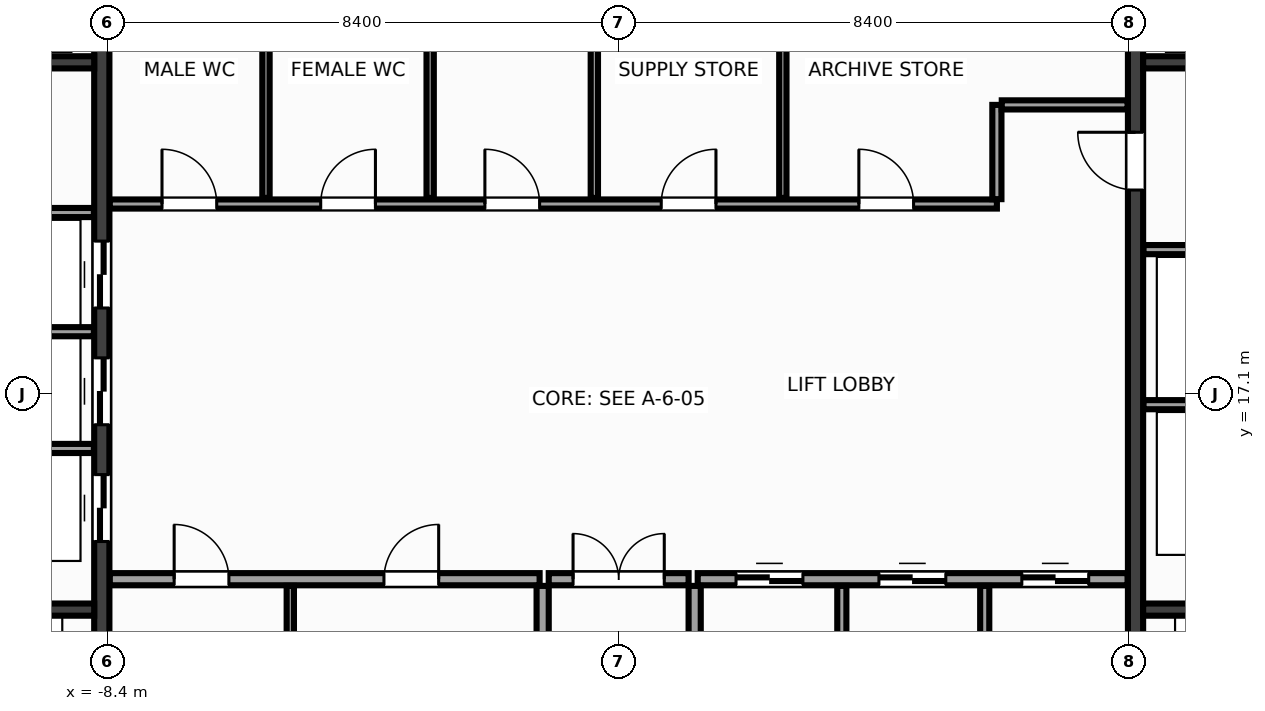
"""IFC4 building model, lengths in metres.
Left out: names, types, materials, properties, quantities, classifications, styles, units other than length and angle.
Written with IfcOpenShell. Run it as: python <this file> out.ifc"""

import sys

from ifc_helpers import new_model, si_unit, direction, frame, frame_2d, origin, place, context, subcontext, project, spatial, rectangle, extrude, source, transform, mapped, element, fill, save


model = new_model("IFC4")
c1 = context("Model", 3, precision=1e-05, world=origin(), true_north=direction((0.0, 1.0)))
c2 = subcontext(c1, "Body", "Model", "MODEL_VIEW")
j1 = project(units=[si_unit("LENGTHUNIT", "METRE"), si_unit("PLANEANGLEUNIT", "RADIAN")], contexts=[c1])
p1 = place(None, origin())
s1 = spatial("IfcSite", under=j1, at=p1, CompositionType="ELEMENT")
p2 = place(p1, origin())
s2 = spatial("IfcBuilding", under=s1, at=p2, CompositionType="ELEMENT")
p3 = place(p2, frame((0.0, 0.0, 138.8)))
s3 = spatial("IfcBuildingStorey", under=s2, at=p3, CompositionType="ELEMENT", Elevation=138.8)
m1 = source(origin(), c2, "Body", "SweptSolid", [
    extrude(rectangle(XDim=12.95, YDim=0.25, at=frame_2d((6.475, 0.0))), origin(), (0.0, 0.0, 1.0), 3.6),
])
p4 = place(p3, frame((-8.5, 10.525, 0.0), z_axis=(0.0, 0.0, 1.0), x_axis=(0.0, 1.0, 0.0)))
e1 = element("IfcWall", 1, at=p4, inside=s3, PredefinedType="SHEAR", context=c2, shape_type="MappedRepresentation", body=[
    mapped(m1, transform((0.0, 0.0, 0.0), x_axis=(1.0, 0.0, 0.0), y_axis=(0.0, 1.0, 0.0), z_axis=(0.0, 0.0, 1.0), scale=1.0)),
])
p5 = place(p4, frame((4.145, 0.0, 0.0)))
e2 = element("IfcOpeningElement", 2, at=p5, cuts=e1, PredefinedType="OPENING", context=c2, shape_type="SweptSolid", body=[
    extrude(rectangle(XDim=1.1, YDim=2.15, at=frame_2d((0.55, 1.075))), frame((0.0, 0.137, 0.0), z_axis=(0.0, -1.0, 0.0), x_axis=(1.0, 0.0, 0.0)), (0.0, 0.0, 1.0), 0.274),
])
p6 = place(p4, frame((6.065, 0.0, 0.0)))
e3 = element("IfcOpeningElement", 3, at=p6, cuts=e1, PredefinedType="OPENING", context=c2, shape_type="SweptSolid", body=[
    extrude(rectangle(XDim=1.1, YDim=2.15, at=frame_2d((0.55, 1.075))), frame((0.0, 0.137, 0.0), z_axis=(0.0, -1.0, 0.0), x_axis=(1.0, 0.0, 0.0)), (0.0, 0.0, 1.0), 0.274),
])
p7 = place(p4, frame((7.985, 0.0, 0.0)))
e4 = element("IfcOpeningElement", 4, at=p7, cuts=e1, PredefinedType="OPENING", context=c2, shape_type="SweptSolid", body=[
    extrude(rectangle(XDim=1.1, YDim=2.15, at=frame_2d((0.55, 1.075))), frame((0.0, 0.137, 0.0), z_axis=(0.0, -1.0, 0.0), x_axis=(1.0, 0.0, 0.0)), (0.0, 0.0, 1.0), 0.274),
])
p8 = place(p3, frame((8.5, 10.525, 0.0), z_axis=(0.0, 0.0, 1.0), x_axis=(0.0, 1.0, 0.0)))
e5 = element("IfcWall", 5, at=p8, inside=s3, PredefinedType="SHEAR", context=c2, shape_type="MappedRepresentation", body=[
    mapped(m1, transform((0.0, 0.0, 0.0), x_axis=(1.0, 0.0, 0.0), y_axis=(0.0, 1.0, 0.0), z_axis=(0.0, 0.0, 1.0), scale=1.0)),
])
p9 = place(p8, frame((9.925, 0.0, 0.0)))
e6 = element("IfcOpeningElement", 6, at=p9, cuts=e5, PredefinedType="OPENING", context=c2, shape_type="SweptSolid", body=[
    extrude(rectangle(XDim=0.95, YDim=2.15, at=frame_2d((0.475, 1.075))), frame((0.0, 0.137, 0.0), z_axis=(0.0, -1.0, 0.0), x_axis=(1.0, 0.0, 0.0)), (0.0, 0.0, 1.0), 0.274),
])
m2 = source(origin(), c2, "Body", "SweptSolid", [
    extrude(rectangle(XDim=2.825, YDim=0.2, at=frame_2d((1.413, 0.0))), origin(), (0.0, 0.0, 1.0), 3.6),
])
for number, where, z_axis, x_axis in (
    (7, (-11.45, 13.55, 0.0), (0.0, 0.0, 1.0), (1.0, 0.0, 0.0)),
    (8, (8.625, 13.55, 0.0), (0.0, 0.0, 1.0), (1.0, 0.0, 0.0)),
):
    element("IfcWall", number, at=place(p3, frame(where, z_axis=z_axis, x_axis=x_axis)), inside=s3, PredefinedType="SHEAR", context=c2, shape_type="MappedRepresentation", body=[
        mapped(m2, transform((0.0, 0.0, 0.0), x_axis=(1.0, 0.0, 0.0), y_axis=(0.0, 1.0, 0.0), z_axis=(0.0, 0.0, 1.0), scale=1.0)),
    ])
m3 = source(origin(), c2, "Body", "SweptSolid", [
    extrude(rectangle(XDim=3.02, YDim=0.2, at=frame_2d((1.51, 0.0))), origin(), (0.0, 0.0, 1.0), 3.6),
])
for number, where, z_axis, x_axis in (
    (9, (-11.645, 22.55, 0.0), (0.0, 0.0, 1.0), (1.0, 0.0, 0.0)),
    (10, (8.625, 22.55, 0.0), (0.0, 0.0, 1.0), (1.0, 0.0, 0.0)),
):
    element("IfcWall", number, at=place(p3, frame(where, z_axis=z_axis, x_axis=x_axis)), inside=s3, PredefinedType="SHEAR", context=c2, shape_type="MappedRepresentation", body=[
        mapped(m3, transform((0.0, 0.0, 0.0), x_axis=(1.0, 0.0, 0.0), y_axis=(0.0, 1.0, 0.0), z_axis=(0.0, 0.0, 1.0), scale=1.0)),
    ])
m4 = source(origin(), c2, "Body", "SweptSolid", [
    extrude(rectangle(XDim=3.01, YDim=0.15, at=frame_2d((1.505, 0.0))), origin(), (0.0, 0.0, 1.0), 3.38),
])
for number, where, z_axis, x_axis in (
    (11, (-11.64, 16.2, 0.0), (0.0, 0.0, 1.0), (1.0, 0.0, 0.0)),
    (12, (-11.64, 18.12, 0.0), (0.0, 0.0, 1.0), (1.0, 0.0, 0.0)),
    (13, (-11.64, 20.08, 0.0), (0.0, 0.0, 1.0), (1.0, 0.0, 0.0)),
    (14, (8.63, 16.92, 0.0), (0.0, 0.0, 1.0), (1.0, 0.0, 0.0)),
    (15, (8.63, 19.47, 0.0), (0.0, 0.0, 1.0), (1.0, 0.0, 0.0)),
):
    element("IfcWall", number, at=place(p3, frame(where, z_axis=z_axis, x_axis=x_axis)), inside=s3, PredefinedType="PARTITIONING", context=c2, shape_type="MappedRepresentation", body=[
        mapped(m4, transform((0.0, 0.0, 0.0), x_axis=(1.0, 0.0, 0.0), y_axis=(0.0, 1.0, 0.0), z_axis=(0.0, 0.0, 1.0), scale=1.0)),
    ])
m5 = source(origin(), c2, "Body", "SweptSolid", [
    extrude(rectangle(XDim=7.07, YDim=0.2, at=frame_2d((3.535, 0.0))), origin(), (0.0, 0.0, 1.0), 3.38),
])
p10 = place(p3, frame((-8.37, 14.05, 0.0), z_axis=(0.0, 0.0, 1.0), x_axis=(1.0, 0.0, 0.0)))
e16 = element("IfcWall", 16, at=p10, inside=s3, PredefinedType="PARTITIONING", context=c2, shape_type="MappedRepresentation", body=[
    mapped(m5, transform((0.0, 0.0, 0.0), x_axis=(1.0, 0.0, 0.0), y_axis=(0.0, 1.0, 0.0), z_axis=(0.0, 0.0, 1.0), scale=1.0)),
])
p11 = place(p10, frame((1.06, 0.0, 0.0)))
e17 = element("IfcOpeningElement", 17, at=p11, cuts=e16, PredefinedType="OPENING", context=c2, shape_type="SweptSolid", body=[
    extrude(rectangle(XDim=0.9, YDim=2.15, at=frame_2d((0.45, 1.075))), frame((0.0, 0.112, 0.0), z_axis=(0.0, -1.0, 0.0), x_axis=(1.0, 0.0, 0.0)), (0.0, 0.0, 1.0), 0.224),
])
p12 = place(p10, frame((4.51, 0.0, 0.0)))
e18 = element("IfcOpeningElement", 18, at=p12, cuts=e16, PredefinedType="OPENING", context=c2, shape_type="SweptSolid", body=[
    extrude(rectangle(XDim=0.9, YDim=2.15, at=frame_2d((0.45, 1.075))), frame((0.0, 0.112, 0.0), z_axis=(0.0, -1.0, 0.0), x_axis=(1.0, 0.0, 0.0)), (0.0, 0.0, 1.0), 0.224),
])
p13 = place(p3, frame((1.3, 14.05, 0.0), z_axis=(0.0, 0.0, 1.0), x_axis=(1.0, 0.0, 0.0)))
e19 = element("IfcWall", 19, at=p13, inside=s3, PredefinedType="PARTITIONING", context=c2, shape_type="MappedRepresentation", body=[
    mapped(m5, transform((0.0, 0.0, 0.0), x_axis=(1.0, 0.0, 0.0), y_axis=(0.0, 1.0, 0.0), z_axis=(0.0, 0.0, 1.0), scale=1.0)),
])
p14 = place(p13, frame((0.63, 0.0, 0.0)))
e20 = element("IfcOpeningElement", 20, at=p14, cuts=e19, PredefinedType="OPENING", context=c2, shape_type="SweptSolid", body=[
    extrude(rectangle(XDim=1.1, YDim=2.15, at=frame_2d((0.55, 1.075))), frame((0.0, 0.112, 0.0), z_axis=(0.0, -1.0, 0.0), x_axis=(1.0, 0.0, 0.0)), (0.0, 0.0, 1.0), 0.224),
])
p15 = place(p13, frame((2.98, 0.0, 0.0)))
e21 = element("IfcOpeningElement", 21, at=p15, cuts=e19, PredefinedType="OPENING", context=c2, shape_type="SweptSolid", body=[
    extrude(rectangle(XDim=1.1, YDim=2.15, at=frame_2d((0.55, 1.075))), frame((0.0, 0.112, 0.0), z_axis=(0.0, -1.0, 0.0), x_axis=(1.0, 0.0, 0.0)), (0.0, 0.0, 1.0), 0.224),
])
p16 = place(p13, frame((5.33, 0.0, 0.0)))
e22 = element("IfcOpeningElement", 22, at=p16, cuts=e19, PredefinedType="OPENING", context=c2, shape_type="SweptSolid", body=[
    extrude(rectangle(XDim=1.1, YDim=2.15, at=frame_2d((0.55, 1.075))), frame((0.0, 0.112, 0.0), z_axis=(0.0, -1.0, 0.0), x_axis=(1.0, 0.0, 0.0)), (0.0, 0.0, 1.0), 0.224),
])
m6 = source(origin(), c2, "Body", "SweptSolid", [
    extrude(rectangle(XDim=3.415, YDim=0.2, at=frame_2d((1.708, 0.0))), origin(), (0.0, 0.0, 1.0), 3.38),
])
for number, where, z_axis, x_axis in (
    (23, (-1.25, 10.525, 0.0), (0.0, 0.0, 1.0), (0.0, 1.0, 0.0)),
    (24, (1.25, 10.525, 0.0), (0.0, 0.0, 1.0), (0.0, 1.0, 0.0)),
):
    element("IfcWall", number, at=place(p3, frame(where, z_axis=z_axis, x_axis=x_axis)), inside=s3, PredefinedType="PARTITIONING", context=c2, shape_type="MappedRepresentation", body=[
        mapped(m6, transform((0.0, 0.0, 0.0), x_axis=(1.0, 0.0, 0.0), y_axis=(0.0, 1.0, 0.0), z_axis=(0.0, 0.0, 1.0), scale=1.0)),
    ])
m7 = source(origin(), c2, "Body", "SweptSolid", [
    extrude(rectangle(XDim=2.3, YDim=0.2, at=frame_2d((1.15, 0.0))), origin(), (0.0, 0.0, 1.0), 3.38),
])
p17 = place(p3, frame((-1.15, 14.05, 0.0), z_axis=(0.0, 0.0, 1.0), x_axis=(1.0, 0.0, 0.0)))
e25 = element("IfcWall", 25, at=p17, inside=s3, PredefinedType="PARTITIONING", context=c2, shape_type="MappedRepresentation", body=[
    mapped(m7, transform((0.0, 0.0, 0.0), x_axis=(1.0, 0.0, 0.0), y_axis=(0.0, 1.0, 0.0), z_axis=(0.0, 0.0, 1.0), scale=1.0)),
])
p18 = place(p17, frame((0.4, 0.0, 0.0)))
e26 = element("IfcOpeningElement", 26, at=p18, cuts=e25, PredefinedType="OPENING", context=c2, shape_type="SweptSolid", body=[
    extrude(rectangle(XDim=1.5, YDim=2.2, at=frame_2d((0.75, 1.1))), frame((0.0, 0.112, 0.0), z_axis=(0.0, -1.0, 0.0), x_axis=(1.0, 0.0, 0.0)), (0.0, 0.0, 1.0), 0.224),
])
m8 = source(origin(), c2, "Body", "SweptSolid", [
    extrude(rectangle(XDim=14.59, YDim=0.15, at=frame_2d((7.295, 0.0))), origin(), (0.0, 0.0, 1.0), 3.38),
])
p19 = place(p3, frame((-8.37, 20.22, 0.0), z_axis=(0.0, 0.0, 1.0), x_axis=(1.0, 0.0, 0.0)))
e27 = element("IfcWall", 27, at=p19, inside=s3, PredefinedType="PARTITIONING", context=c2, shape_type="MappedRepresentation", body=[
    mapped(m8, transform((0.0, 0.0, 0.0), x_axis=(1.0, 0.0, 0.0), y_axis=(0.0, 1.0, 0.0), z_axis=(0.0, 0.0, 1.0), scale=1.0)),
])
p20 = place(p19, frame((0.86, 0.0, 0.0)))
e28 = element("IfcOpeningElement", 28, at=p20, cuts=e27, PredefinedType="OPENING", context=c2, shape_type="SweptSolid", body=[
    extrude(rectangle(XDim=0.9, YDim=2.15, at=frame_2d((0.45, 1.075))), frame((0.0, 0.087, 0.0), z_axis=(0.0, -1.0, 0.0), x_axis=(1.0, 0.0, 0.0)), (0.0, 0.0, 1.0), 0.174),
])
p21 = place(p19, frame((3.47, 0.0, 0.0)))
e29 = element("IfcOpeningElement", 29, at=p21, cuts=e27, PredefinedType="OPENING", context=c2, shape_type="SweptSolid", body=[
    extrude(rectangle(XDim=0.9, YDim=2.15, at=frame_2d((0.45, 1.075))), frame((0.0, 0.087, 0.0), z_axis=(0.0, -1.0, 0.0), x_axis=(1.0, 0.0, 0.0)), (0.0, 0.0, 1.0), 0.174),
])
p22 = place(p19, frame((6.17, 0.0, 0.0)))
e30 = element("IfcOpeningElement", 30, at=p22, cuts=e27, PredefinedType="OPENING", context=c2, shape_type="SweptSolid", body=[
    extrude(rectangle(XDim=0.9, YDim=2.15, at=frame_2d((0.45, 1.075))), frame((0.0, 0.087, 0.0), z_axis=(0.0, -1.0, 0.0), x_axis=(1.0, 0.0, 0.0)), (0.0, 0.0, 1.0), 0.174),
])
p23 = place(p19, frame((9.07, 0.0, 0.0)))
e31 = element("IfcOpeningElement", 31, at=p23, cuts=e27, PredefinedType="OPENING", context=c2, shape_type="SweptSolid", body=[
    extrude(rectangle(XDim=0.9, YDim=2.15, at=frame_2d((0.45, 1.075))), frame((0.0, 0.087, 0.0), z_axis=(0.0, -1.0, 0.0), x_axis=(1.0, 0.0, 0.0)), (0.0, 0.0, 1.0), 0.174),
])
p24 = place(p19, frame((12.32, 0.0, 0.0)))
e32 = element("IfcOpeningElement", 32, at=p24, cuts=e27, PredefinedType="OPENING", context=c2, shape_type="SweptSolid", body=[
    extrude(rectangle(XDim=0.9, YDim=2.15, at=frame_2d((0.45, 1.075))), frame((0.0, 0.087, 0.0), z_axis=(0.0, -1.0, 0.0), x_axis=(1.0, 0.0, 0.0)), (0.0, 0.0, 1.0), 0.174),
])
m9 = source(origin(), c2, "Body", "SweptSolid", [
    extrude(rectangle(XDim=1.55, YDim=0.15, at=frame_2d((0.775, 0.0))), origin(), (0.0, 0.0, 1.0), 3.38),
])
p25 = place(p3, frame((6.22, 20.3, 0.0), z_axis=(0.0, 0.0, 1.0), x_axis=(0.0, 1.0, 0.0)))
e33 = element("IfcWall", 33, at=p25, inside=s3, PredefinedType="PARTITIONING", context=c2, shape_type="MappedRepresentation", body=[
    mapped(m9, transform((0.0, 0.0, 0.0), x_axis=(1.0, 0.0, 0.0), y_axis=(0.0, 1.0, 0.0), z_axis=(0.0, 0.0, 1.0), scale=1.0)),
])
m10 = source(origin(), c2, "Body", "SweptSolid", [
    extrude(rectangle(XDim=2.07, YDim=0.15, at=frame_2d((1.035, 0.0))), origin(), (0.0, 0.0, 1.0), 3.38),
])
p26 = place(p3, frame((6.3, 21.85, 0.0), z_axis=(0.0, 0.0, 1.0), x_axis=(1.0, 0.0, 0.0)))
e34 = element("IfcWall", 34, at=p26, inside=s3, PredefinedType="PARTITIONING", context=c2, shape_type="MappedRepresentation", body=[
    mapped(m10, transform((0.0, 0.0, 0.0), x_axis=(1.0, 0.0, 0.0), y_axis=(0.0, 1.0, 0.0), z_axis=(0.0, 0.0, 1.0), scale=1.0)),
])
m11 = source(origin(), c2, "Body", "SweptSolid", [
    extrude(rectangle(XDim=3.415, YDim=0.12, at=frame_2d((1.708, 0.0))), origin(), (0.0, 0.0, 1.0), 3.38),
])
p27 = place(p3, frame((-5.4, 10.525, 0.0), z_axis=(0.0, 0.0, 1.0), x_axis=(0.0, 1.0, 0.0)))
e35 = element("IfcWall", 35, at=p27, inside=s3, PredefinedType="PARTITIONING", context=c2, shape_type="MappedRepresentation", body=[
    mapped(m11, transform((0.0, 0.0, 0.0), x_axis=(1.0, 0.0, 0.0), y_axis=(0.0, 1.0, 0.0), z_axis=(0.0, 0.0, 1.0), scale=1.0)),
])
m12 = source(origin(), c2, "Body", "SweptSolid", [
    extrude(rectangle(XDim=3.415, YDim=0.15, at=frame_2d((1.708, 0.0))), origin(), (0.0, 0.0, 1.0), 3.38),
])
for number, where, z_axis, x_axis in (
    (36, (3.67, 10.525, 0.0), (0.0, 0.0, 1.0), (0.0, 1.0, 0.0)),
    (37, (6.02, 10.525, 0.0), (0.0, 0.0, 1.0), (0.0, 1.0, 0.0)),
):
    element("IfcWall", number, at=place(p3, frame(where, z_axis=z_axis, x_axis=x_axis)), inside=s3, PredefinedType="PARTITIONING", context=c2, shape_type="MappedRepresentation", body=[
        mapped(m12, transform((0.0, 0.0, 0.0), x_axis=(1.0, 0.0, 0.0), y_axis=(0.0, 1.0, 0.0), z_axis=(0.0, 0.0, 1.0), scale=1.0)),
    ])
m13 = source(origin(), c2, "Body", "SweptSolid", [
    extrude(rectangle(XDim=3.115, YDim=0.12, at=frame_2d((1.558, 0.0))), origin(), (0.0, 0.0, 1.0), 3.38),
])
for number, where, z_axis, x_axis in (
    (38, (-5.8, 20.32, 0.0), (0.0, 0.0, 1.0), (0.0, 1.0, 0.0)),
    (39, (-3.1, 20.32, 0.0), (0.0, 0.0, 1.0), (0.0, 1.0, 0.0)),
    (40, (-0.4, 20.32, 0.0), (0.0, 0.0, 1.0), (0.0, 1.0, 0.0)),
    (41, (2.7, 20.32, 0.0), (0.0, 0.0, 1.0), (0.0, 1.0, 0.0)),
):
    element("IfcWall", number, at=place(p3, frame(where, z_axis=z_axis, x_axis=x_axis)), inside=s3, PredefinedType="PARTITIONING", context=c2, shape_type="MappedRepresentation", body=[
        mapped(m13, transform((0.0, 0.0, 0.0), x_axis=(1.0, 0.0, 0.0), y_axis=(0.0, 1.0, 0.0), z_axis=(0.0, 0.0, 1.0), scale=1.0)),
    ])
m14 = source(origin(), c2, "Body", "SweptSolid", [
    extrude(rectangle(XDim=1.1, YDim=2.15, at=frame_2d((0.55, 1.075))), frame((0.0, 0.025, 0.0), z_axis=(0.0, -1.0, 0.0), x_axis=(1.0, 0.0, 0.0)), (0.0, 0.0, 1.0), 0.05),
])
p28 = place(p5, origin())
e42 = element("IfcDoor", 42, at=p28, inside=s3, OperationType="DOUBLE_DOOR_SLIDING", PredefinedType="DOOR", context=c2, shape_type="MappedRepresentation", body=[
    mapped(m14, transform((0.0, 0.0, 0.0), x_axis=(1.0, 0.0, 0.0), y_axis=(0.0, 1.0, 0.0), z_axis=(0.0, 0.0, 1.0), scale=1.0)),
])
fill(e2, e42)
p29 = place(p6, origin())
e43 = element("IfcDoor", 43, at=p29, inside=s3, OperationType="DOUBLE_DOOR_SLIDING", PredefinedType="DOOR", context=c2, shape_type="MappedRepresentation", body=[
    mapped(m14, transform((0.0, 0.0, 0.0), x_axis=(1.0, 0.0, 0.0), y_axis=(0.0, 1.0, 0.0), z_axis=(0.0, 0.0, 1.0), scale=1.0)),
])
fill(e3, e43)
p30 = place(p7, origin())
e44 = element("IfcDoor", 44, at=p30, inside=s3, OperationType="DOUBLE_DOOR_SLIDING", PredefinedType="DOOR", context=c2, shape_type="MappedRepresentation", body=[
    mapped(m14, transform((0.0, 0.0, 0.0), x_axis=(1.0, 0.0, 0.0), y_axis=(0.0, 1.0, 0.0), z_axis=(0.0, 0.0, 1.0), scale=1.0)),
])
fill(e4, e44)
m15 = source(origin(), c2, "Body", "SweptSolid", [
    extrude(rectangle(XDim=0.95, YDim=2.15, at=frame_2d((0.475, 1.075))), frame((0.0, 0.025, 0.0), z_axis=(0.0, -1.0, 0.0), x_axis=(1.0, 0.0, 0.0)), (0.0, 0.0, 1.0), 0.05),
])
p31 = place(p9, origin())
e45 = element("IfcDoor", 45, at=p31, inside=s3, OperationType="SINGLE_SWING_RIGHT", PredefinedType="DOOR", context=c2, shape_type="MappedRepresentation", body=[
    mapped(m15, transform((0.0, 0.0, 0.0), x_axis=(1.0, 0.0, 0.0), y_axis=(0.0, 1.0, 0.0), z_axis=(0.0, 0.0, 1.0), scale=1.0)),
])
fill(e6, e45)
m16 = source(origin(), c2, "Body", "SweptSolid", [
    extrude(rectangle(XDim=0.9, YDim=2.15, at=frame_2d((0.45, 1.075))), frame((0.0, 0.025, 0.0), z_axis=(0.0, -1.0, 0.0), x_axis=(1.0, 0.0, 0.0)), (0.0, 0.0, 1.0), 0.05),
])
p32 = place(p11, origin())
e46 = element("IfcDoor", 46, at=p32, inside=s3, OperationType="SINGLE_SWING_LEFT", PredefinedType="DOOR", context=c2, shape_type="MappedRepresentation", body=[
    mapped(m16, transform((0.0, 0.0, 0.0), x_axis=(1.0, 0.0, 0.0), y_axis=(0.0, 1.0, 0.0), z_axis=(0.0, 0.0, 1.0), scale=1.0)),
])
fill(e17, e46)
p33 = place(p12, origin())
e47 = element("IfcDoor", 47, at=p33, inside=s3, OperationType="SINGLE_SWING_RIGHT", PredefinedType="DOOR", context=c2, shape_type="MappedRepresentation", body=[
    mapped(m16, transform((0.0, 0.0, 0.0), x_axis=(1.0, 0.0, 0.0), y_axis=(0.0, 1.0, 0.0), z_axis=(0.0, 0.0, 1.0), scale=1.0)),
])
fill(e18, e47)
p34 = place(p14, origin())
e48 = element("IfcDoor", 48, at=p34, inside=s3, OperationType="DOUBLE_DOOR_SLIDING", PredefinedType="DOOR", context=c2, shape_type="MappedRepresentation", body=[
    mapped(m14, transform((0.0, 0.0, 0.0), x_axis=(1.0, 0.0, 0.0), y_axis=(0.0, 1.0, 0.0), z_axis=(0.0, 0.0, 1.0), scale=1.0)),
])
fill(e20, e48)
p35 = place(p15, origin())
e49 = element("IfcDoor", 49, at=p35, inside=s3, OperationType="DOUBLE_DOOR_SLIDING", PredefinedType="DOOR", context=c2, shape_type="MappedRepresentation", body=[
    mapped(m14, transform((0.0, 0.0, 0.0), x_axis=(1.0, 0.0, 0.0), y_axis=(0.0, 1.0, 0.0), z_axis=(0.0, 0.0, 1.0), scale=1.0)),
])
fill(e21, e49)
p36 = place(p16, origin())
e50 = element("IfcDoor", 50, at=p36, inside=s3, OperationType="DOUBLE_DOOR_SLIDING", PredefinedType="DOOR", context=c2, shape_type="MappedRepresentation", body=[
    mapped(m14, transform((0.0, 0.0, 0.0), x_axis=(1.0, 0.0, 0.0), y_axis=(0.0, 1.0, 0.0), z_axis=(0.0, 0.0, 1.0), scale=1.0)),
])
fill(e22, e50)
m17 = source(origin(), c2, "Body", "SweptSolid", [
    extrude(rectangle(XDim=1.5, YDim=2.2, at=frame_2d((0.75, 1.1))), frame((0.0, 0.025, 0.0), z_axis=(0.0, -1.0, 0.0), x_axis=(1.0, 0.0, 0.0)), (0.0, 0.0, 1.0), 0.05),
])
p37 = place(p18, origin())
e51 = element("IfcDoor", 51, at=p37, inside=s3, OperationType="DOUBLE_DOOR_SINGLE_SWING", PredefinedType="DOOR", context=c2, shape_type="MappedRepresentation", body=[
    mapped(m17, transform((0.0, 0.0, 0.0), x_axis=(1.0, 0.0, 0.0), y_axis=(0.0, 1.0, 0.0), z_axis=(0.0, 0.0, 1.0), scale=1.0)),
])
fill(e26, e51)
p38 = place(p20, origin())
e52 = element("IfcDoor", 52, at=p38, inside=s3, OperationType="SINGLE_SWING_LEFT", PredefinedType="DOOR", context=c2, shape_type="MappedRepresentation", body=[
    mapped(m16, transform((0.0, 0.0, 0.0), x_axis=(1.0, 0.0, 0.0), y_axis=(0.0, 1.0, 0.0), z_axis=(0.0, 0.0, 1.0), scale=1.0)),
])
fill(e28, e52)
p39 = place(p21, origin())
e53 = element("IfcDoor", 53, at=p39, inside=s3, OperationType="SINGLE_SWING_RIGHT", PredefinedType="DOOR", context=c2, shape_type="MappedRepresentation", body=[
    mapped(m16, transform((0.0, 0.0, 0.0), x_axis=(1.0, 0.0, 0.0), y_axis=(0.0, 1.0, 0.0), z_axis=(0.0, 0.0, 1.0), scale=1.0)),
])
fill(e29, e53)
p40 = place(p22, origin())
e54 = element("IfcDoor", 54, at=p40, inside=s3, OperationType="SINGLE_SWING_LEFT", PredefinedType="DOOR", context=c2, shape_type="MappedRepresentation", body=[
    mapped(m16, transform((0.0, 0.0, 0.0), x_axis=(1.0, 0.0, 0.0), y_axis=(0.0, 1.0, 0.0), z_axis=(0.0, 0.0, 1.0), scale=1.0)),
])
fill(e30, e54)
p41 = place(p23, origin())
e55 = element("IfcDoor", 55, at=p41, inside=s3, OperationType="SINGLE_SWING_RIGHT", PredefinedType="DOOR", context=c2, shape_type="MappedRepresentation", body=[
    mapped(m16, transform((0.0, 0.0, 0.0), x_axis=(1.0, 0.0, 0.0), y_axis=(0.0, 1.0, 0.0), z_axis=(0.0, 0.0, 1.0), scale=1.0)),
])
fill(e31, e55)
p42 = place(p24, origin())
e56 = element("IfcDoor", 56, at=p42, inside=s3, OperationType="SINGLE_SWING_LEFT", PredefinedType="DOOR", context=c2, shape_type="MappedRepresentation", body=[
    mapped(m16, transform((0.0, 0.0, 0.0), x_axis=(1.0, 0.0, 0.0), y_axis=(0.0, 1.0, 0.0), z_axis=(0.0, 0.0, 1.0), scale=1.0)),
])
fill(e32, e56)
save(model, sys.argv[1])
